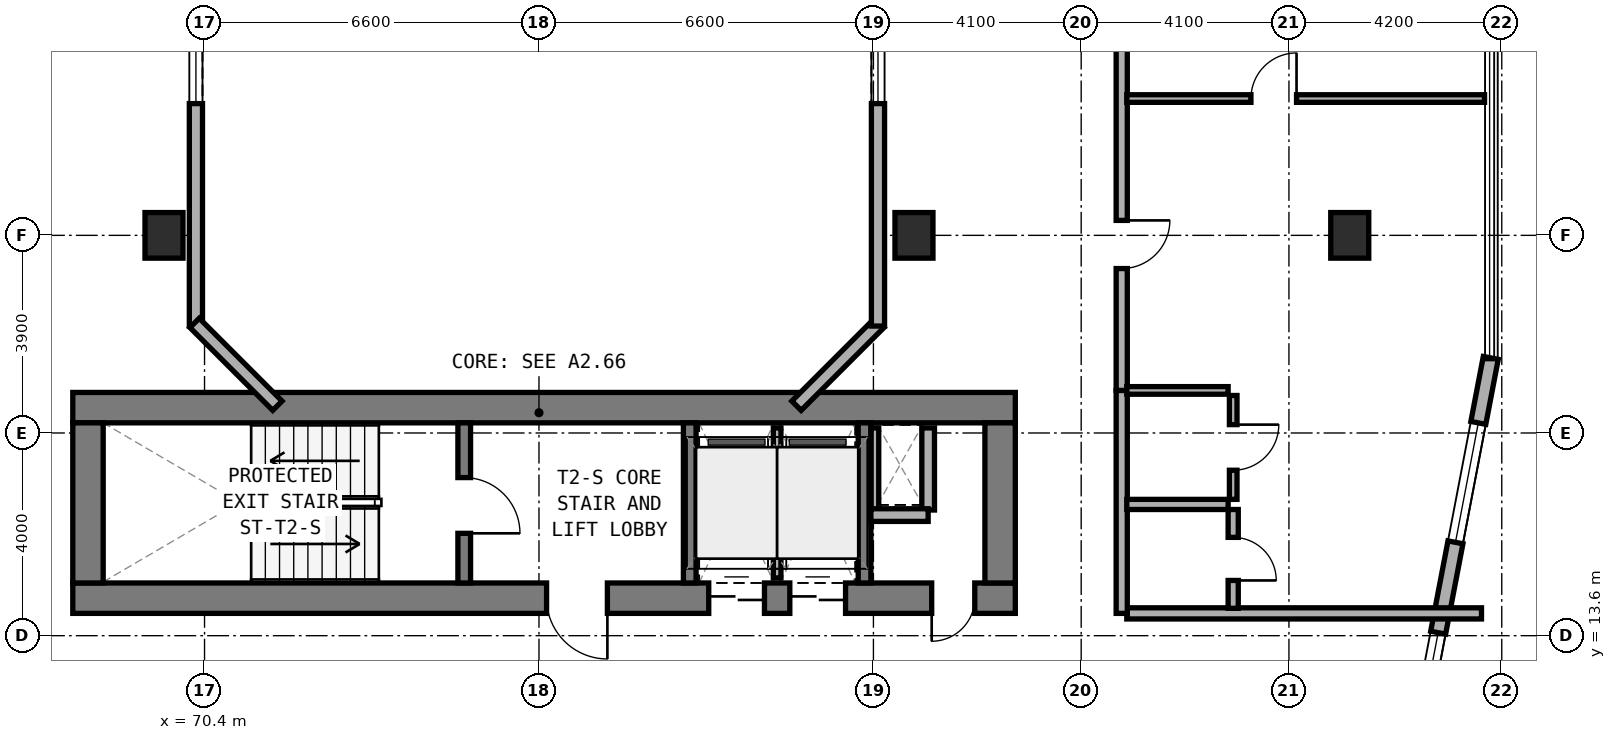
"""IFC4 building model, lengths in metres.
Left out: names, types, materials, properties, quantities, classifications, styles, units other than length and angle.
Written with IfcOpenShell. Run it as: python <this file> out.ifc"""

import sys

from ifc_helpers import new_model, si_unit, direction, frame, frame_2d, origin, origin_2d, place, context, subcontext, project, spatial, rectangle, extrude, element, fill, save


model = new_model("IFC4")
c1 = context("Model", 3, precision=1e-05, world=origin(), true_north=direction((0.0, 1.0)))
c2 = subcontext(c1, "Body", "Model", "MODEL_VIEW")
j1 = project(units=[si_unit("LENGTHUNIT", "METRE"), si_unit("PLANEANGLEUNIT", "RADIAN")], contexts=[c1])
p1 = place(None, origin())
s1 = spatial("IfcSite", under=j1, at=p1, CompositionType="ELEMENT")
p2 = place(p1, origin())
s2 = spatial("IfcBuilding", under=s1, at=p2, CompositionType="ELEMENT")
p3 = place(p2, frame((0.0, 0.0, 24.0)))
s3 = spatial("IfcBuildingStorey", under=s2, at=p3, CompositionType="ELEMENT", Elevation=24.0)
p4 = place(p3, frame((67.8, 14.34, 0.0), z_axis=(0.0, 0.0, 1.0), x_axis=(1.0, 0.0, 0.0)))
e1 = element("IfcWall", 1, at=p4, inside=s3, PredefinedType="SHEAR", context=c2, shape_type="SweptSolid", body=[
    extrude(rectangle(XDim=18.6, YDim=0.6, at=frame_2d((9.3, 0.0))), origin(), (0.0, 0.0, 1.0), 3.5),
])
p5 = place(p4, frame((9.35, 0.0, 0.0)))
e2 = element("IfcOpeningElement", 2, at=p5, cuts=e1, PredefinedType="OPENING", context=c2, shape_type="SweptSolid", body=[
    extrude(rectangle(XDim=1.2, YDim=2.15, at=frame_2d((0.6, 1.075))), frame((0.0, 0.31, 0.0), z_axis=(0.0, -1.0, 0.0), x_axis=(1.0, 0.0, 0.0)), (0.0, 0.0, 1.0), 0.62),
])
p6 = place(p4, frame((16.95, 0.0, 0.0)))
e3 = element("IfcOpeningElement", 3, at=p6, cuts=e1, PredefinedType="OPENING", context=c2, shape_type="SweptSolid", body=[
    extrude(rectangle(XDim=0.85, YDim=2.1, at=frame_2d((0.425, 1.05))), frame((0.0, 0.31, 0.0), z_axis=(0.0, -1.0, 0.0), x_axis=(1.0, 0.0, 0.0)), (0.0, 0.0, 1.0), 0.62),
])
p7 = place(p4, frame((12.55, 0.0, 0.0)))
e4 = element("IfcOpeningElement", 4, at=p7, cuts=e1, PredefinedType="OPENING", context=c2, shape_type="SweptSolid", body=[
    extrude(rectangle(XDim=1.1, YDim=2.15, at=frame_2d((0.55, 1.075))), frame((0.0, 0.31, 0.0), z_axis=(0.0, -1.0, 0.0), x_axis=(1.0, 0.0, 0.0)), (0.0, 0.0, 1.0), 0.62),
])
p8 = place(p4, frame((14.15, 0.0, 0.0)))
e5 = element("IfcOpeningElement", 5, at=p8, cuts=e1, PredefinedType="OPENING", context=c2, shape_type="SweptSolid", body=[
    extrude(rectangle(XDim=1.1, YDim=2.15, at=frame_2d((0.55, 1.075))), frame((0.0, 0.31, 0.0), z_axis=(0.0, -1.0, 0.0), x_axis=(1.0, 0.0, 0.0)), (0.0, 0.0, 1.0), 0.62),
])
p9 = place(p3, frame((67.8, 18.1, 0.0), z_axis=(0.0, 0.0, 1.0), x_axis=(1.0, 0.0, 0.0)))
e6 = element("IfcWall", 6, at=p9, inside=s3, PredefinedType="SHEAR", context=c2, shape_type="SweptSolid", body=[
    extrude(rectangle(XDim=18.6, YDim=0.6, at=frame_2d((9.3, 0.0))), origin(), (0.0, 0.0, 1.0), 3.5),
])
for number, where, z_axis, x_axis in (
    (7, (68.1, 14.64, 0.0), (0.0, 0.0, 1.0), (0.0, 1.0, 0.0)),
    (8, (86.1, 14.64, 0.0), (0.0, 0.0, 1.0), (0.0, 1.0, 0.0)),
):
    element("IfcWall", number, at=place(p3, frame(where, z_axis=z_axis, x_axis=x_axis)), inside=s3, PredefinedType="SHEAR", context=c2, shape_type="SweptSolid", body=[
        extrude(rectangle(XDim=3.16, YDim=0.6, at=frame_2d((1.58, 0.0))), origin(), (0.0, 0.0, 1.0), 3.5),
    ])
p10 = place(p3, frame((75.525, 14.64, 0.0), z_axis=(0.0, 0.0, 1.0), x_axis=(0.0, 1.0, 0.0)))
e9 = element("IfcWall", 9, at=p10, inside=s3, PredefinedType="STANDARD", context=c2, shape_type="SweptSolid", body=[
    extrude(rectangle(XDim=3.16, YDim=0.25, at=frame_2d((1.58, 0.0))), origin(), (0.0, 0.0, 1.0), 3.25),
])
p11 = place(p10, frame((0.98, 0.0, 0.0)))
e10 = element("IfcOpeningElement", 10, at=p11, cuts=e9, PredefinedType="OPENING", context=c2, shape_type="SweptSolid", body=[
    extrude(rectangle(XDim=1.1, YDim=2.15, at=frame_2d((0.55, 1.075))), frame((0.0, 0.135, 0.0), z_axis=(0.0, -1.0, 0.0), x_axis=(1.0, 0.0, 0.0)), (0.0, 0.0, 1.0), 0.27),
])
for number, where, z_axis, x_axis in (
    (11, (79.975, 14.64, 0.0), (0.0, 0.0, 1.0), (0.0, 1.0, 0.0)),
    (12, (83.425, 14.64, 0.0), (0.0, 0.0, 1.0), (0.0, 1.0, 0.0)),
):
    element("IfcWall", number, at=place(p3, frame(where, z_axis=z_axis, x_axis=x_axis)), inside=s3, PredefinedType="STANDARD", context=c2, shape_type="SweptSolid", body=[
        extrude(rectangle(XDim=3.16, YDim=0.25, at=frame_2d((1.58, 0.0))), origin(), (0.0, 0.0, 1.0), 3.25),
    ])
for number, where, z_axis, x_axis in (
    (13, (93.0, 21.5, 0.0), (0.0, 0.0, 1.0), (1.0, 0.0, 0.0)),
    (14, (69.6, 21.5, 0.0), (0.0, 0.0, 1.0), (1.0, 0.0, 0.0)),
    (15, (84.4, 21.5, 0.0), (0.0, 0.0, 1.0), (1.0, 0.0, 0.0)),
):
    element("IfcColumn", number, at=place(p3, frame(where, z_axis=z_axis, x_axis=x_axis)), inside=s3, PredefinedType="COLUMN", context=c2, shape_type="SweptSolid", body=[
        extrude(rectangle(XDim=0.75, YDim=0.9, at=origin_2d()), origin(), (0.0, 0.0, 1.0), 3.5),
    ])
p12 = place(p3, frame((93.971, 9.62, 0.0), z_axis=(0.0, 0.0, 1.0), x_axis=(0.188087874316, 0.982152203854, 0.0)))
e16 = element("IfcWall", 16, at=p12, inside=s3, PredefinedType="STANDARD", context=c2, shape_type="SweptSolid", body=[
    extrude(rectangle(XDim=9.634, YDim=0.3, at=frame_2d((4.817, 0.0))), origin(), (0.0, 0.0, 1.0), 3.25),
])
p13 = place(p12, frame((0.452, 0.0, 0.85)))
e17 = element("IfcOpeningElement", 17, at=p13, cuts=e16, PredefinedType="OPENING", context=c2, shape_type="SweptSolid", body=[
    extrude(rectangle(XDim=1.5, YDim=1.5, at=frame_2d((0.75, 0.75))), frame((0.0, 0.16, 0.0), z_axis=(0.0, -1.0, 0.0), x_axis=(1.0, 0.0, 0.0)), (0.0, 0.0, 1.0), 0.32),
])
p14 = place(p12, frame((2.913, 0.0, 0.85)))
e18 = element("IfcOpeningElement", 18, at=p14, cuts=e16, PredefinedType="OPENING", context=c2, shape_type="SweptSolid", body=[
    extrude(rectangle(XDim=1.2, YDim=1.5, at=frame_2d((0.6, 0.75))), frame((0.0, 0.16, 0.0), z_axis=(0.0, -1.0, 0.0), x_axis=(1.0, 0.0, 0.0)), (0.0, 0.0, 1.0), 0.32),
])
p15 = place(p12, frame((5.928, 0.0, 0.8)))
e19 = element("IfcOpeningElement", 19, at=p15, cuts=e16, PredefinedType="OPENING", context=c2, shape_type="SweptSolid", body=[
    extrude(rectangle(XDim=2.4, YDim=1.6, at=frame_2d((1.2, 0.8))), frame((0.0, 0.16, 0.0), z_axis=(0.0, -1.0, 0.0), x_axis=(1.0, 0.0, 0.0)), (0.0, 0.0, 1.0), 0.32),
])
p16 = place(p3, frame((82.082, 18.138, 0.0), z_axis=(0.0, 0.0, 1.0), x_axis=(0.707106781187, 0.707106781187, 0.0)))
e20 = element("IfcWall", 20, at=p16, inside=s3, PredefinedType="STANDARD", context=c2, shape_type="SweptSolid", body=[
    extrude(rectangle(XDim=2.311, YDim=0.26, at=frame_2d((1.155, 0.0))), origin(), (0.0, 0.0, 1.0), 3.25),
])
p17 = place(p3, frame((83.69, 19.71, 0.0), z_axis=(0.0, 0.0, 1.0), x_axis=(0.0, 1.0, 0.0)))
e21 = element("IfcWall", 21, at=p17, inside=s3, PredefinedType="STANDARD", context=c2, shape_type="SweptSolid", body=[
    extrude(rectangle(XDim=10.58, YDim=0.26, at=frame_2d((5.29, 0.0))), origin(), (0.0, 0.0, 1.0), 3.25),
])
p18 = place(p17, frame((4.39, 0.0, 0.85)))
e22 = element("IfcOpeningElement", 22, at=p18, cuts=e21, PredefinedType="OPENING", context=c2, shape_type="SweptSolid", body=[
    extrude(rectangle(XDim=1.8, YDim=1.5, at=frame_2d((0.9, 0.75))), frame((0.0, 0.14, 0.0), z_axis=(0.0, -1.0, 0.0), x_axis=(1.0, 0.0, 0.0)), (0.0, 0.0, 1.0), 0.28),
])
p19 = place(p3, frame((70.23, 30.29, 0.0), z_axis=(0.0, 0.0, 1.0), x_axis=(0.0, -1.0, 0.0)))
e23 = element("IfcWall", 23, at=p19, inside=s3, PredefinedType="STANDARD", context=c2, shape_type="SweptSolid", body=[
    extrude(rectangle(XDim=10.58, YDim=0.26, at=frame_2d((5.29, 0.0))), origin(), (0.0, 0.0, 1.0), 3.25),
])
p20 = place(p19, frame((4.39, 0.0, 0.85)))
e24 = element("IfcOpeningElement", 24, at=p20, cuts=e23, PredefinedType="OPENING", context=c2, shape_type="SweptSolid", body=[
    extrude(rectangle(XDim=1.8, YDim=1.5, at=frame_2d((0.9, 0.75))), frame((0.0, 0.14, 0.0), z_axis=(0.0, -1.0, 0.0), x_axis=(1.0, 0.0, 0.0)), (0.0, 0.0, 1.0), 0.28),
])
p21 = place(p3, frame((70.204, 19.772, 0.0), z_axis=(0.0, 0.0, 1.0), x_axis=(0.707053950914, -0.707159607512, 0.0)))
e25 = element("IfcWall", 25, at=p21, inside=s3, PredefinedType="STANDARD", context=c2, shape_type="SweptSolid", body=[
    extrude(rectangle(XDim=2.311, YDim=0.26, at=frame_2d((1.155, 0.0))), origin(), (0.0, 0.0, 1.0), 3.25),
])
p22 = place(p3, frame((83.63, 16.08, 0.0), z_axis=(0.0, 0.0, 1.0), x_axis=(0.0, 1.0, 0.0)))
e26 = element("IfcWall", 26, at=p22, inside=s3, PredefinedType="PARTITIONING", context=c2, shape_type="SweptSolid", body=[
    extrude(rectangle(XDim=1.62, YDim=0.15, at=frame_2d((0.81, 0.0))), origin(), (0.0, 0.0, 1.0), 2.725),
])
p23 = place(p3, frame((84.68, 16.08, 0.0), z_axis=(0.0, 0.0, 1.0), x_axis=(0.0, 1.0, 0.0)))
e27 = element("IfcWall", 27, at=p23, inside=s3, PredefinedType="SOLIDWALL", context=c2, shape_type="SweptSolid", body=[
    extrude(rectangle(XDim=1.62, YDim=0.25, at=frame_2d((0.81, 0.0))), origin(), (0.0, 0.0, 1.0), 3.22),
])
p24 = place(p3, frame((83.55, 15.98, 0.0), z_axis=(0.0, 0.0, 1.0), x_axis=(1.0, 0.0, 0.0)))
e28 = element("IfcWall", 28, at=p24, inside=s3, PredefinedType="SOLIDWALL", context=c2, shape_type="SweptSolid", body=[
    extrude(rectangle(XDim=1.13, YDim=0.25, at=frame_2d((0.565, 0.0))), origin(), (0.0, 0.0, 1.0), 3.22),
])
p25 = place(p3, frame((81.7, 14.74, 0.0), z_axis=(0.0, 0.0, 1.0), x_axis=(0.0, 1.0, 0.0)))
e29 = element("IfcWall", 29, at=p25, inside=s3, PredefinedType="PARTITIONING", context=c2, shape_type="SweptSolid", body=[
    extrude(rectangle(XDim=2.96, YDim=0.15, at=frame_2d((1.48, 0.0))), origin(), (0.0, 0.0, 1.0), 3.22),
])
p26 = place(p3, frame((88.6, 14.04, 0.0), z_axis=(0.0, 0.0, 1.0), x_axis=(1.0, 0.0, 0.0)))
e30 = element("IfcWall", 30, at=p26, inside=s3, PredefinedType="SOLIDWALL", context=c2, shape_type="SweptSolid", body=[
    extrude(rectangle(XDim=7.0, YDim=0.22, at=frame_2d((3.5, 0.0))), origin(), (0.0, 0.0, 1.0), 2.865),
])
p27 = place(p3, frame((88.5, 14.04, 0.0), z_axis=(0.0, 0.0, 1.0), x_axis=(0.0, 1.0, 0.0)))
e31 = element("IfcWall", 31, at=p27, inside=s3, PredefinedType="SOLIDWALL", context=c2, shape_type="SweptSolid", body=[
    extrude(rectangle(XDim=4.4, YDim=0.22, at=frame_2d((2.2, 0.0))), origin(), (0.0, 0.0, 1.0), 3.22),
])
p28 = place(p3, frame((88.5, 18.44, 0.0), z_axis=(0.0, 0.0, 1.0), x_axis=(0.0, 1.0, 0.0)))
e32 = element("IfcWall", 32, at=p28, inside=s3, PredefinedType="SOLIDWALL", context=c2, shape_type="SweptSolid", body=[
    extrude(rectangle(XDim=9.56, YDim=0.22, at=frame_2d((4.78, 0.0))), origin(), (0.0, 0.0, 1.0), 2.725),
])
p29 = place(p28, frame((2.405, 0.0, 0.0)))
e33 = element("IfcOpeningElement", 33, at=p29, cuts=e32, PredefinedType="OPENING", context=c2, shape_type="SweptSolid", body=[
    extrude(rectangle(XDim=0.95, YDim=2.1, at=frame_2d((0.475, 1.05))), frame((0.0, 0.12, 0.0), z_axis=(0.0, -1.0, 0.0), x_axis=(1.0, 0.0, 0.0)), (0.0, 0.0, 1.0), 0.24),
])
p30 = place(p3, frame((88.6, 24.2, 0.0), z_axis=(0.0, 0.0, 1.0), x_axis=(1.0, 0.0, 0.0)))
e34 = element("IfcWall", 34, at=p30, inside=s3, PredefinedType="PARTITIONING", context=c2, shape_type="SweptSolid", body=[
    extrude(rectangle(XDim=7.06, YDim=0.15, at=frame_2d((3.53, 0.0))), origin(), (0.0, 0.0, 1.0), 2.865),
])
p31 = place(p30, frame((2.45, 0.0, 0.0)))
e35 = element("IfcOpeningElement", 35, at=p31, cuts=e34, PredefinedType="OPENING", context=c2, shape_type="SweptSolid", body=[
    extrude(rectangle(XDim=0.9, YDim=2.1, at=frame_2d((0.45, 1.05))), frame((0.0, 0.085, 0.0), z_axis=(0.0, -1.0, 0.0), x_axis=(1.0, 0.0, 0.0)), (0.0, 0.0, 1.0), 0.17),
])
p32 = place(p3, frame((88.6, 16.19, 0.0), z_axis=(0.0, 0.0, 1.0), x_axis=(1.0, 0.0, 0.0)))
e36 = element("IfcWall", 36, at=p32, inside=s3, PredefinedType="PLUMBINGWALL", context=c2, shape_type="SweptSolid", body=[
    extrude(rectangle(XDim=2.0, YDim=0.2, at=frame_2d((1.0, 0.0))), origin(), (0.0, 0.0, 1.0), 3.22),
])
p33 = place(p3, frame((88.6, 18.44, 0.0), z_axis=(0.0, 0.0, 1.0), x_axis=(1.0, 0.0, 0.0)))
e37 = element("IfcWall", 37, at=p33, inside=s3, PredefinedType="PARTITIONING", context=c2, shape_type="SweptSolid", body=[
    extrude(rectangle(XDim=2.0, YDim=0.15, at=frame_2d((1.0, 0.0))), origin(), (0.0, 0.0, 1.0), 3.22),
])
p34 = place(p3, frame((90.7, 14.14, 0.0), z_axis=(0.0, 0.0, 1.0), x_axis=(0.0, 1.0, 0.0)))
e38 = element("IfcWall", 38, at=p34, inside=s3, PredefinedType="PLUMBINGWALL", context=c2, shape_type="SweptSolid", body=[
    extrude(rectangle(XDim=1.95, YDim=0.2, at=frame_2d((0.975, 0.0))), origin(), (0.0, 0.0, 1.0), 3.22),
])
p35 = place(p34, frame((0.55, 0.0, 0.0)))
e39 = element("IfcOpeningElement", 39, at=p35, cuts=e38, PredefinedType="OPENING", context=c2, shape_type="SweptSolid", body=[
    extrude(rectangle(XDim=0.85, YDim=2.1, at=frame_2d((0.425, 1.05))), frame((0.0, 0.11, 0.0), z_axis=(0.0, -1.0, 0.0), x_axis=(1.0, 0.0, 0.0)), (0.0, 0.0, 1.0), 0.22),
])
p36 = place(p3, frame((90.7, 16.29, 0.0), z_axis=(0.0, 0.0, 1.0), x_axis=(0.0, 1.0, 0.0)))
e40 = element("IfcWall", 40, at=p36, inside=s3, PredefinedType="PARTITIONING", context=c2, shape_type="SweptSolid", body=[
    extrude(rectangle(XDim=2.05, YDim=0.15, at=frame_2d((1.025, 0.0))), origin(), (0.0, 0.0, 1.0), 3.22),
])
p37 = place(p36, frame((0.575, 0.0, 0.0)))
e41 = element("IfcOpeningElement", 41, at=p37, cuts=e40, PredefinedType="OPENING", context=c2, shape_type="SweptSolid", body=[
    extrude(rectangle(XDim=0.9, YDim=2.1, at=frame_2d((0.45, 1.05))), frame((0.0, 0.085, 0.0), z_axis=(0.0, -1.0, 0.0), x_axis=(1.0, 0.0, 0.0)), (0.0, 0.0, 1.0), 0.17),
])
p38 = place(p14, origin())
e42 = element("IfcWindow", 42, at=p38, inside=s3, PartitioningType="SINGLE_PANEL", PredefinedType="WINDOW", context=c2, shape_type="SweptSolid", body=[
    extrude(rectangle(XDim=1.2, YDim=1.5, at=frame_2d((0.6, 0.75))), frame((0.0, 0.03, 0.0), z_axis=(0.0, -1.0, 0.0), x_axis=(1.0, 0.0, 0.0)), (0.0, 0.0, 1.0), 0.06),
])
fill(e18, e42)
p39 = place(p15, origin())
e43 = element("IfcWindow", 43, at=p39, inside=s3, PartitioningType="SINGLE_PANEL", PredefinedType="WINDOW", context=c2, shape_type="SweptSolid", body=[
    extrude(rectangle(XDim=2.4, YDim=1.6, at=frame_2d((1.2, 0.8))), frame((0.0, 0.03, 0.0), z_axis=(0.0, -1.0, 0.0), x_axis=(1.0, 0.0, 0.0)), (0.0, 0.0, 1.0), 0.06),
])
fill(e19, e43)
p40 = place(p18, origin())
e44 = element("IfcWindow", 44, at=p40, inside=s3, PartitioningType="SINGLE_PANEL", PredefinedType="WINDOW", context=c2, shape_type="SweptSolid", body=[
    extrude(rectangle(XDim=1.8, YDim=1.5, at=frame_2d((0.9, 0.75))), frame((0.0, 0.03, 0.0), z_axis=(0.0, -1.0, 0.0), x_axis=(1.0, 0.0, 0.0)), (0.0, 0.0, 1.0), 0.06),
])
fill(e22, e44)
p41 = place(p20, origin())
e45 = element("IfcWindow", 45, at=p41, inside=s3, PartitioningType="SINGLE_PANEL", PredefinedType="WINDOW", context=c2, shape_type="SweptSolid", body=[
    extrude(rectangle(XDim=1.8, YDim=1.5, at=frame_2d((0.9, 0.75))), frame((0.0, 0.03, 0.0), z_axis=(0.0, -1.0, 0.0), x_axis=(1.0, 0.0, 0.0)), (0.0, 0.0, 1.0), 0.06),
])
fill(e24, e45)
p42 = place(p11, frame((1.1, 0.0, 0.0), z_axis=(0.0, 0.0, 1.0), x_axis=(-1.0, 0.0, 0.0)))
e46 = element("IfcDoor", 46, at=p42, inside=s3, OperationType="SINGLE_SWING_RIGHT", PredefinedType="DOOR", context=c2, shape_type="SweptSolid", body=[
    extrude(rectangle(XDim=1.1, YDim=2.15, at=frame_2d((0.55, 1.075))), frame((0.0, 0.025, 0.0), z_axis=(0.0, -1.0, 0.0), x_axis=(1.0, 0.0, 0.0)), (0.0, 0.0, 1.0), 0.05),
])
fill(e10, e46)
p43 = place(p5, frame((1.2, 0.0, 0.0), z_axis=(0.0, 0.0, 1.0), x_axis=(-1.0, 0.0, 0.0)))
e47 = element("IfcDoor", 47, at=p43, inside=s3, OperationType="SINGLE_SWING_LEFT", PredefinedType="DOOR", context=c2, shape_type="SweptSolid", body=[
    extrude(rectangle(XDim=1.2, YDim=2.15, at=frame_2d((0.6, 1.075))), frame((0.0, 0.025, 0.0), z_axis=(0.0, -1.0, 0.0), x_axis=(1.0, 0.0, 0.0)), (0.0, 0.0, 1.0), 0.05),
])
fill(e2, e47)
p44 = place(p6, frame((0.85, 0.0, 0.0), z_axis=(0.0, 0.0, 1.0), x_axis=(-1.0, 0.0, 0.0)))
e48 = element("IfcDoor", 48, at=p44, inside=s3, OperationType="SINGLE_SWING_RIGHT", PredefinedType="DOOR", context=c2, shape_type="SweptSolid", body=[
    extrude(rectangle(XDim=0.85, YDim=2.1, at=frame_2d((0.425, 1.05))), frame((0.0, 0.025, 0.0), z_axis=(0.0, -1.0, 0.0), x_axis=(1.0, 0.0, 0.0)), (0.0, 0.0, 1.0), 0.05),
])
fill(e3, e48)
p45 = place(p7, frame((1.1, 0.0, 0.0), z_axis=(0.0, 0.0, 1.0), x_axis=(-1.0, 0.0, 0.0)))
e49 = element("IfcDoor", 49, at=p45, inside=s3, OperationType="DOUBLE_DOOR_SLIDING", PredefinedType="DOOR", context=c2, shape_type="SweptSolid", body=[
    extrude(rectangle(XDim=1.1, YDim=2.15, at=frame_2d((0.55, 1.075))), frame((0.0, 0.025, 0.0), z_axis=(0.0, -1.0, 0.0), x_axis=(1.0, 0.0, 0.0)), (0.0, 0.0, 1.0), 0.05),
])
fill(e4, e49)
p46 = place(p8, frame((1.1, 0.0, 0.0), z_axis=(0.0, 0.0, 1.0), x_axis=(-1.0, 0.0, 0.0)))
e50 = element("IfcDoor", 50, at=p46, inside=s3, OperationType="DOUBLE_DOOR_SLIDING", PredefinedType="DOOR", context=c2, shape_type="SweptSolid", body=[
    extrude(rectangle(XDim=1.1, YDim=2.15, at=frame_2d((0.55, 1.075))), frame((0.0, 0.025, 0.0), z_axis=(0.0, -1.0, 0.0), x_axis=(1.0, 0.0, 0.0)), (0.0, 0.0, 1.0), 0.05),
])
fill(e5, e50)
p47 = place(p29, frame((0.95, 0.0, 0.0), z_axis=(0.0, 0.0, 1.0), x_axis=(-1.0, 0.0, 0.0)))
e51 = element("IfcDoor", 51, at=p47, inside=s3, OperationType="SINGLE_SWING_LEFT", PredefinedType="DOOR", context=c2, shape_type="SweptSolid", body=[
    extrude(rectangle(XDim=0.95, YDim=2.1, at=frame_2d((0.475, 1.05))), frame((0.0, 0.025, 0.0), z_axis=(0.0, -1.0, 0.0), x_axis=(1.0, 0.0, 0.0)), (0.0, 0.0, 1.0), 0.05),
])
fill(e33, e51)
p48 = place(p31, origin())
e52 = element("IfcDoor", 52, at=p48, inside=s3, OperationType="SINGLE_SWING_RIGHT", PredefinedType="DOOR", context=c2, shape_type="SweptSolid", body=[
    extrude(rectangle(XDim=0.9, YDim=2.1, at=frame_2d((0.45, 1.05))), frame((0.0, 0.025, 0.0), z_axis=(0.0, -1.0, 0.0), x_axis=(1.0, 0.0, 0.0)), (0.0, 0.0, 1.0), 0.05),
])
fill(e35, e52)
p49 = place(p35, frame((0.85, 0.0, 0.0), z_axis=(0.0, 0.0, 1.0), x_axis=(-1.0, 0.0, 0.0)))
e53 = element("IfcDoor", 53, at=p49, inside=s3, OperationType="SINGLE_SWING_RIGHT", PredefinedType="DOOR", context=c2, shape_type="SweptSolid", body=[
    extrude(rectangle(XDim=0.85, YDim=2.1, at=frame_2d((0.425, 1.05))), frame((0.0, 0.025, 0.0), z_axis=(0.0, -1.0, 0.0), x_axis=(1.0, 0.0, 0.0)), (0.0, 0.0, 1.0), 0.05),
])
fill(e39, e53)
p50 = place(p37, frame((0.9, 0.0, 0.0), z_axis=(0.0, 0.0, 1.0), x_axis=(-1.0, 0.0, 0.0)))
e54 = element("IfcDoor", 54, at=p50, inside=s3, OperationType="SINGLE_SWING_LEFT", PredefinedType="DOOR", context=c2, shape_type="SweptSolid", body=[
    extrude(rectangle(XDim=0.9, YDim=2.1, at=frame_2d((0.45, 1.05))), frame((0.0, 0.025, 0.0), z_axis=(0.0, -1.0, 0.0), x_axis=(1.0, 0.0, 0.0)), (0.0, 0.0, 1.0), 0.05),
])
fill(e41, e54)
save(model, sys.argv[1])
